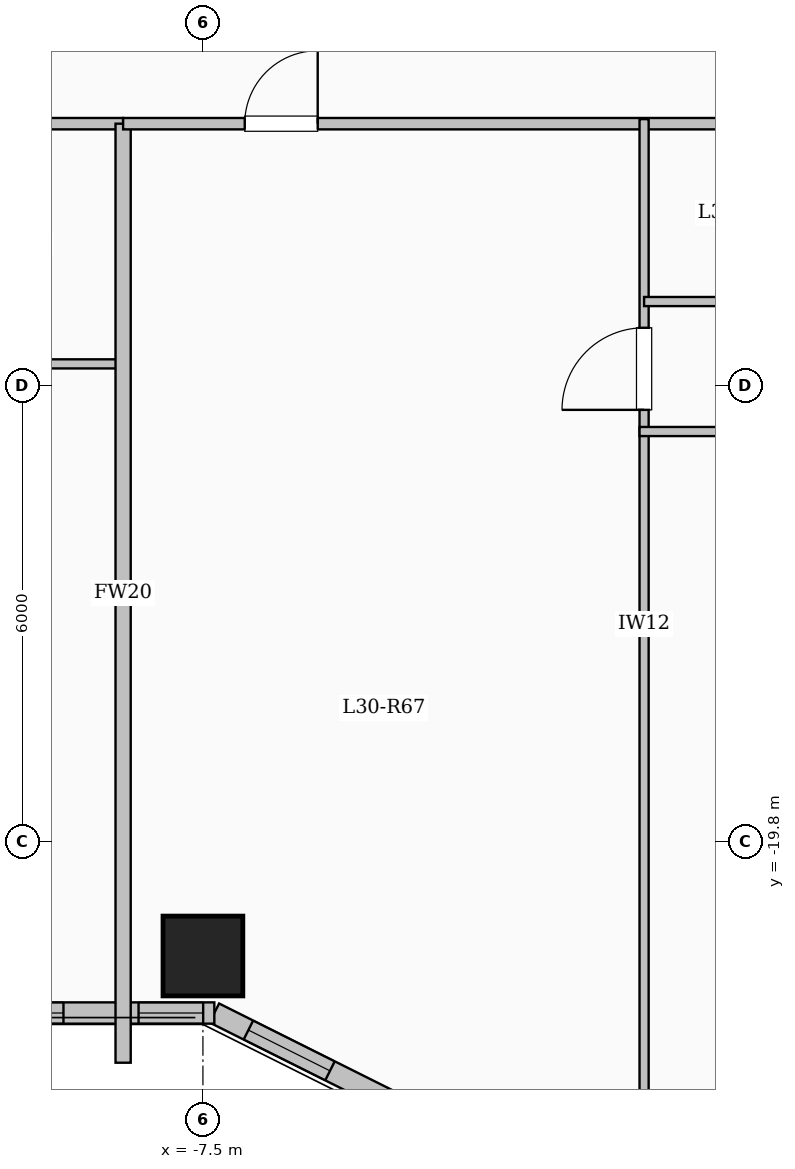
"""IFC4 building model, lengths in metres.
Left out: names, types, materials, properties, quantities, classifications, styles, units other than length and angle.
Written with IfcOpenShell. Run it as: python <this file> out.ifc"""

import sys

from ifc_helpers import new_model, si_unit, direction, frame, frame_2d, origin, origin_2d, place, context, subcontext, project, spatial, rectangle, extrude, element, fill, save


model = new_model("IFC4")
c1 = context("Model", 3, precision=1e-05, world=origin(), true_north=direction((0.0, 1.0)))
c2 = subcontext(c1, "Body", "Model", "MODEL_VIEW")
j1 = project(units=[si_unit("LENGTHUNIT", "METRE"), si_unit("PLANEANGLEUNIT", "RADIAN")], contexts=[c1])
p1 = place(None, origin())
s1 = spatial("IfcSite", under=j1, at=p1, CompositionType="ELEMENT")
p2 = place(p1, origin())
s2 = spatial("IfcBuilding", under=s1, at=p2, CompositionType="ELEMENT")
p3 = place(p2, frame((0.0, 0.0, 111.8)))
s3 = spatial("IfcBuildingStorey", under=s2, at=p3, CompositionType="ELEMENT", Elevation=111.8)
p4 = place(p3, frame((-7.5, -21.3, 0.0), z_axis=(0.0, 0.0, 1.0), x_axis=(1.0, 0.0, 0.0)))
e1 = element("IfcColumn", 1, at=p4, inside=s3, PredefinedType="COLUMN", context=c2, shape_type="SweptSolid", body=[
    extrude(rectangle(XDim=1.05, YDim=1.05, at=origin_2d()), origin(), (0.0, 0.0, 1.0), 3.35),
])
p5 = place(p3, frame((-4.35, -23.55, 0.0), z_axis=(0.0, 0.0, 1.0), x_axis=(-0.894427191, 0.4472135955, 0.0)))
e2 = element("IfcWall", 2, at=p5, inside=s3, PredefinedType="SOLIDWALL", context=c2, shape_type="SweptSolid", body=[
    extrude(rectangle(XDim=3.354, YDim=0.28, at=frame_2d((1.677, 0.0))), origin(), (0.0, 0.0, 1.0), 3.1),
])
p6 = place(p5, frame((1.653, 0.0, 0.95)))
e3 = element("IfcOpeningElement", 3, at=p6, cuts=e2, PredefinedType="OPENING", context=c2, shape_type="SweptSolid", body=[
    extrude(rectangle(XDim=1.2, YDim=1.5, at=frame_2d((0.6, 0.75))), frame((0.0, 0.15, 0.0), z_axis=(0.0, -1.0, 0.0), x_axis=(1.0, 0.0, 0.0)), (0.0, 0.0, 1.0), 0.3),
])
p7 = place(p3, frame((-7.35, -22.05, 0.0), z_axis=(0.0, 0.0, 1.0), x_axis=(-1.0, 0.0, 0.0)))
e4 = element("IfcWall", 4, at=p7, inside=s3, PredefinedType="SOLIDWALL", context=c2, shape_type="SweptSolid", body=[
    extrude(rectangle(XDim=13.8, YDim=0.28, at=frame_2d((6.9, 0.0))), origin(), (0.0, 0.0, 1.0), 3.1),
])
p8 = place(p7, frame((0.147, 0.0, 0.95)))
e5 = element("IfcOpeningElement", 5, at=p8, cuts=e4, PredefinedType="OPENING", context=c2, shape_type="SweptSolid", body=[
    extrude(rectangle(XDim=0.85, YDim=1.5, at=frame_2d((0.425, 0.75))), frame((0.0, 0.15, 0.0), z_axis=(0.0, -1.0, 0.0), x_axis=(1.0, 0.0, 0.0)), (0.0, 0.0, 1.0), 0.3),
])
p9 = place(p7, frame((1.985, 0.0, 0.9)))
e6 = element("IfcOpeningElement", 6, at=p9, cuts=e4, PredefinedType="OPENING", context=c2, shape_type="SweptSolid", body=[
    extrude(rectangle(XDim=1.5, YDim=1.65, at=frame_2d((0.75, 0.825))), frame((0.0, 0.15, 0.0), z_axis=(0.0, -1.0, 0.0), x_axis=(1.0, 0.0, 0.0)), (0.0, 0.0, 1.0), 0.3),
])
p10 = place(p7, frame((5.096, 0.0, 0.9)))
e7 = element("IfcOpeningElement", 7, at=p10, cuts=e4, PredefinedType="OPENING", context=c2, shape_type="SweptSolid", body=[
    extrude(rectangle(XDim=1.5, YDim=1.65, at=frame_2d((0.75, 0.825))), frame((0.0, 0.15, 0.0), z_axis=(0.0, -1.0, 0.0), x_axis=(1.0, 0.0, 0.0)), (0.0, 0.0, 1.0), 0.3),
])
p11 = place(p7, frame((8.208, 0.0, 0.9)))
e8 = element("IfcOpeningElement", 8, at=p11, cuts=e4, PredefinedType="OPENING", context=c2, shape_type="SweptSolid", body=[
    extrude(rectangle(XDim=1.5, YDim=1.65, at=frame_2d((0.75, 0.825))), frame((0.0, 0.15, 0.0), z_axis=(0.0, -1.0, 0.0), x_axis=(1.0, 0.0, 0.0)), (0.0, 0.0, 1.0), 0.3),
])
p12 = place(p7, frame((11.344, 0.0, 0.9)))
e9 = element("IfcOpeningElement", 9, at=p12, cuts=e4, PredefinedType="OPENING", context=c2, shape_type="SweptSolid", body=[
    extrude(rectangle(XDim=1.5, YDim=1.65, at=frame_2d((0.75, 0.825))), frame((0.0, 0.15, 0.0), z_axis=(0.0, -1.0, 0.0), x_axis=(1.0, 0.0, 0.0)), (0.0, 0.0, 1.0), 0.3),
])
p13 = place(p3, frame((-21.05, -10.35, 0.0), z_axis=(0.0, 0.0, 1.0), x_axis=(1.0, 0.0, 0.0)))
e10 = element("IfcWall", 10, at=p13, inside=s3, PredefinedType="PARTITIONING", context=c2, shape_type="SweptSolid", body=[
    extrude(rectangle(XDim=12.5, YDim=0.15, at=frame_2d((6.25, 0.0))), origin(), (0.0, 0.0, 1.0), 3.1),
])
p14 = place(p13, frame((0.7, 0.0, 0.0)))
e11 = element("IfcOpeningElement", 11, at=p14, cuts=e10, PredefinedType="OPENING", context=c2, shape_type="SweptSolid", body=[
    extrude(rectangle(XDim=0.96, YDim=2.15, at=frame_2d((0.48, 1.075))), frame((0.0, 0.085, 0.0), z_axis=(0.0, -1.0, 0.0), x_axis=(1.0, 0.0, 0.0)), (0.0, 0.0, 1.0), 0.17),
])
p15 = place(p13, frame((6.925, 0.0, 0.0)))
e12 = element("IfcOpeningElement", 12, at=p15, cuts=e10, PredefinedType="OPENING", context=c2, shape_type="SweptSolid", body=[
    extrude(rectangle(XDim=0.96, YDim=2.15, at=frame_2d((0.48, 1.075))), frame((0.0, 0.085, 0.0), z_axis=(0.0, -1.0, 0.0), x_axis=(1.0, 0.0, 0.0)), (0.0, 0.0, 1.0), 0.17),
])
p16 = place(p3, frame((-11.65, -13.51, 0.0), z_axis=(0.0, 0.0, 1.0), x_axis=(1.0, 0.0, 0.0)))
e13 = element("IfcWall", 13, at=p16, inside=s3, PredefinedType="PARTITIONING", context=c2, shape_type="SweptSolid", body=[
    extrude(rectangle(XDim=3.11, YDim=0.12, at=frame_2d((1.555, 0.0))), origin(), (0.0, 0.0, 1.0), 3.1),
])
p17 = place(p3, frame((-8.55, -22.704, 0.0), z_axis=(0.0, 0.0, 1.0), x_axis=(0.0, 1.0, 0.0)))
e14 = element("IfcWall", 14, at=p17, inside=s3, PredefinedType="SOLIDWALL", context=c2, shape_type="SweptSolid", body=[
    extrude(rectangle(XDim=12.354, YDim=0.2, at=frame_2d((6.177, 0.0))), origin(), (0.0, 0.0, 1.0), 3.1),
])
p18 = place(p3, frame((-8.55, -10.35, 0.0), z_axis=(0.0, 0.0, 1.0), x_axis=(1.0, 0.0, 0.0)))
e15 = element("IfcWall", 15, at=p18, inside=s3, PredefinedType="PARTITIONING", context=c2, shape_type="SweptSolid", body=[
    extrude(rectangle(XDim=17.1, YDim=0.15, at=frame_2d((8.55, 0.0))), origin(), (0.0, 0.0, 1.0), 3.1),
])
p19 = place(p18, frame((1.6, 0.0, 0.0)))
e16 = element("IfcOpeningElement", 16, at=p19, cuts=e15, PredefinedType="OPENING", context=c2, shape_type="SweptSolid", body=[
    extrude(rectangle(XDim=0.96, YDim=2.15, at=frame_2d((0.48, 1.075))), frame((0.0, 0.085, 0.0), z_axis=(0.0, -1.0, 0.0), x_axis=(1.0, 0.0, 0.0)), (0.0, 0.0, 1.0), 0.17),
])
p20 = place(p3, frame((-1.696, -23.58, 0.0), z_axis=(0.0, 0.0, 1.0), x_axis=(0.0, 1.0, 0.0)))
e17 = element("IfcWall", 17, at=p20, inside=s3, PredefinedType="PARTITIONING", context=c2, shape_type="SweptSolid", body=[
    extrude(rectangle(XDim=13.29, YDim=0.12, at=frame_2d((6.645, 0.0))), origin(), (0.0, 0.0, 1.0), 3.1),
])
p21 = place(p20, frame((9.465, 0.0, 0.0)))
e18 = element("IfcOpeningElement", 18, at=p21, cuts=e17, PredefinedType="OPENING", context=c2, shape_type="SweptSolid", body=[
    extrude(rectangle(XDim=1.08, YDim=2.15, at=frame_2d((0.54, 1.075))), frame((0.0, 0.07, 0.0), z_axis=(0.0, -1.0, 0.0), x_axis=(1.0, 0.0, 0.0)), (0.0, 0.0, 1.0), 0.14),
])
p22 = place(p3, frame((-1.696, -12.69, 0.0), z_axis=(0.0, 0.0, 1.0), x_axis=(1.0, 0.0, 0.0)))
e19 = element("IfcWall", 19, at=p22, inside=s3, PredefinedType="PARTITIONING", context=c2, shape_type="SweptSolid", body=[
    extrude(rectangle(XDim=5.8, YDim=0.12, at=frame_2d((2.9, 0.0))), origin(), (0.0, 0.0, 1.0), 2.635),
])
p23 = place(p22, frame((2.46, 0.0, 0.0)))
e20 = element("IfcOpeningElement", 20, at=p23, cuts=e19, PredefinedType="OPENING", context=c2, shape_type="SweptSolid", body=[
    extrude(rectangle(XDim=0.88, YDim=2.1, at=frame_2d((0.44, 1.05))), frame((0.0, 0.07, 0.0), z_axis=(0.0, -1.0, 0.0), x_axis=(1.0, 0.0, 0.0)), (0.0, 0.0, 1.0), 0.14),
])
p24 = place(p3, frame((-1.756, -14.4, 0.0), z_axis=(0.0, 0.0, 1.0), x_axis=(1.0, 0.0, 0.0)))
e21 = element("IfcWall", 21, at=p24, inside=s3, PredefinedType="PARTITIONING", context=c2, shape_type="SweptSolid", body=[
    extrude(rectangle(XDim=10.366, YDim=0.12, at=frame_2d((5.183, 0.0))), origin(), (0.0, 0.0, 1.0), 2.635),
])
p25 = place(p24, frame((1.256, 0.0, 0.0)))
e22 = element("IfcOpeningElement", 22, at=p25, cuts=e21, PredefinedType="OPENING", context=c2, shape_type="SweptSolid", body=[
    extrude(rectangle(XDim=0.88, YDim=2.1, at=frame_2d((0.44, 1.05))), frame((0.0, 0.07, 0.0), z_axis=(0.0, -1.0, 0.0), x_axis=(1.0, 0.0, 0.0)), (0.0, 0.0, 1.0), 0.14),
])
p26 = place(p24, frame((4.648, 0.0, 0.0)))
e23 = element("IfcOpeningElement", 23, at=p26, cuts=e21, PredefinedType="OPENING", context=c2, shape_type="SweptSolid", body=[
    extrude(rectangle(XDim=0.88, YDim=2.1, at=frame_2d((0.44, 1.05))), frame((0.0, 0.07, 0.0), z_axis=(0.0, -1.0, 0.0), x_axis=(1.0, 0.0, 0.0)), (0.0, 0.0, 1.0), 0.14),
])
p27 = place(p24, frame((8.04, 0.0, 0.0)))
e24 = element("IfcOpeningElement", 24, at=p27, cuts=e21, PredefinedType="OPENING", context=c2, shape_type="SweptSolid", body=[
    extrude(rectangle(XDim=0.88, YDim=2.1, at=frame_2d((0.44, 1.05))), frame((0.0, 0.07, 0.0), z_axis=(0.0, -1.0, 0.0), x_axis=(1.0, 0.0, 0.0)), (0.0, 0.0, 1.0), 0.14),
])
p28 = place(p6, origin())
e25 = element("IfcWindow", 25, at=p28, inside=s3, PartitioningType="SINGLE_PANEL", PredefinedType="WINDOW", context=c2, shape_type="SweptSolid", body=[
    extrude(rectangle(XDim=1.2, YDim=1.5, at=frame_2d((0.6, 0.75))), frame((0.0, 0.03, 0.0), z_axis=(0.0, -1.0, 0.0), x_axis=(1.0, 0.0, 0.0)), (0.0, 0.0, 1.0), 0.06),
])
fill(e3, e25)
p29 = place(p8, origin())
e26 = element("IfcWindow", 26, at=p29, inside=s3, PartitioningType="SINGLE_PANEL", PredefinedType="WINDOW", context=c2, shape_type="SweptSolid", body=[
    extrude(rectangle(XDim=0.85, YDim=1.5, at=frame_2d((0.425, 0.75))), frame((0.0, 0.03, 0.0), z_axis=(0.0, -1.0, 0.0), x_axis=(1.0, 0.0, 0.0)), (0.0, 0.0, 1.0), 0.06),
])
fill(e5, e26)
p30 = place(p9, origin())
e27 = element("IfcWindow", 27, at=p30, inside=s3, PartitioningType="SINGLE_PANEL", PredefinedType="WINDOW", context=c2, shape_type="SweptSolid", body=[
    extrude(rectangle(XDim=1.5, YDim=1.65, at=frame_2d((0.75, 0.825))), frame((0.0, 0.03, 0.0), z_axis=(0.0, -1.0, 0.0), x_axis=(1.0, 0.0, 0.0)), (0.0, 0.0, 1.0), 0.06),
])
fill(e6, e27)
p31 = place(p19, origin())
e28 = element("IfcDoor", 28, at=p31, inside=s3, OperationType="SINGLE_SWING_RIGHT", PredefinedType="DOOR", context=c2, shape_type="SweptSolid", body=[
    extrude(rectangle(XDim=0.96, YDim=2.15, at=frame_2d((0.48, 1.075))), frame((0.0, 0.025, 0.0), z_axis=(0.0, -1.0, 0.0), x_axis=(1.0, 0.0, 0.0)), (0.0, 0.0, 1.0), 0.05),
])
fill(e16, e28)
p32 = place(p21, origin())
e29 = element("IfcDoor", 29, at=p32, inside=s3, OperationType="SINGLE_SWING_LEFT", PredefinedType="DOOR", context=c2, shape_type="SweptSolid", body=[
    extrude(rectangle(XDim=1.08, YDim=2.15, at=frame_2d((0.54, 1.075))), frame((0.0, 0.025, 0.0), z_axis=(0.0, -1.0, 0.0), x_axis=(1.0, 0.0, 0.0)), (0.0, 0.0, 1.0), 0.05),
])
fill(e18, e29)
save(model, sys.argv[1])
